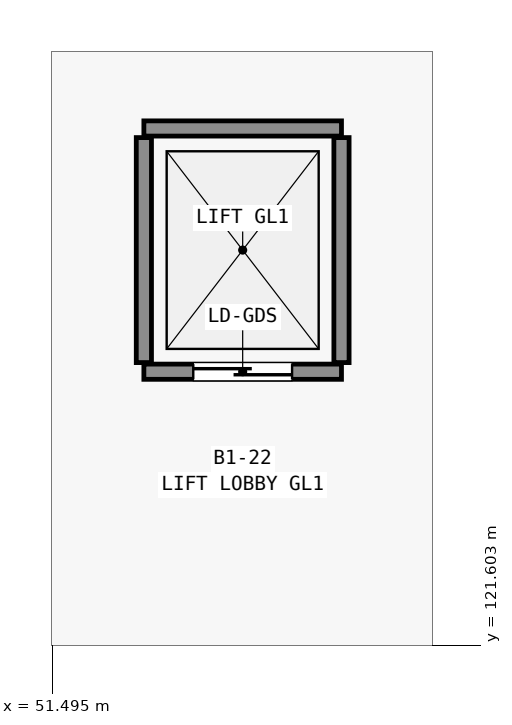
"""IFC4 building model, lengths in metres.
Left out: names, types, materials, properties, quantities, classifications, styles, units other than length and angle.
Written with IfcOpenShell. Run it as: python <this file> out.ifc"""

import sys

from ifc_helpers import new_model, si_unit, direction, frame, frame_2d, origin, place, context, subcontext, project, spatial, rectangle, extrude, element, fill, save


model = new_model("IFC4")
c1 = context("Model", 3, precision=1e-05, world=origin(), true_north=direction((0.0, 1.0)))
c2 = subcontext(c1, "Body", "Model", "MODEL_VIEW")
j1 = project(units=[si_unit("LENGTHUNIT", "METRE"), si_unit("PLANEANGLEUNIT", "RADIAN")], contexts=[c1])
p1 = place(None, origin())
s1 = spatial("IfcSite", under=j1, at=p1, CompositionType="ELEMENT")
p2 = place(p1, origin())
s2 = spatial("IfcBuilding", under=s1, at=p2, CompositionType="ELEMENT")
p3 = place(p2, frame((0.0, 0.0, -5.4)))
s3 = spatial("IfcBuildingStorey", under=s2, at=p3, CompositionType="ELEMENT", Elevation=-5.4)
p4 = place(p3, frame((52.7, 125.2, 0.0), z_axis=(0.0, 0.0, 1.0), x_axis=(1.0, 0.0, 0.0)))
e1 = element("IfcWall", 1, at=p4, inside=s3, PredefinedType="STANDARD", context=c2, shape_type="SweptSolid", body=[
    extrude(rectangle(XDim=2.6, YDim=0.2, at=frame_2d((1.3, 0.0))), origin(), (0.0, 0.0, 1.0), 5.0),
])
p5 = place(p4, frame((0.65, 0.0, 0.0)))
e2 = element("IfcOpeningElement", 2, at=p5, cuts=e1, PredefinedType="OPENING", context=c2, shape_type="SweptSolid", body=[
    extrude(rectangle(XDim=1.3, YDim=2.15, at=frame_2d((0.65, 1.075))), frame((0.0, 0.11, 0.0), z_axis=(0.0, -1.0, 0.0), x_axis=(1.0, 0.0, 0.0)), (0.0, 0.0, 1.0), 0.22),
])
p6 = place(p3, frame((52.7, 128.4, 0.0), z_axis=(0.0, 0.0, 1.0), x_axis=(1.0, 0.0, 0.0)))
e3 = element("IfcWall", 3, at=p6, inside=s3, PredefinedType="STANDARD", context=c2, shape_type="SweptSolid", body=[
    extrude(rectangle(XDim=2.6, YDim=0.2, at=frame_2d((1.3, 0.0))), origin(), (0.0, 0.0, 1.0), 5.0),
])
for number, where, z_axis, x_axis in (
    (4, (52.7, 125.32, 0.0), (0.0, 0.0, 1.0), (0.0, 1.0, 0.0)),
    (5, (55.3, 125.32, 0.0), (0.0, 0.0, 1.0), (0.0, 1.0, 0.0)),
):
    element("IfcWall", number, at=place(p3, frame(where, z_axis=z_axis, x_axis=x_axis)), inside=s3, PredefinedType="STANDARD", context=c2, shape_type="SweptSolid", body=[
        extrude(rectangle(XDim=2.96, YDim=0.2, at=frame_2d((1.48, 0.0))), origin(), (0.0, 0.0, 1.0), 5.0),
    ])
p7 = place(p5, origin())
e6 = element("IfcDoor", 6, at=p7, inside=s3, OperationType="SLIDING_TO_LEFT", PredefinedType="DOOR", context=c2, shape_type="SweptSolid", body=[
    extrude(rectangle(XDim=1.3, YDim=2.15, at=frame_2d((0.65, 1.075))), frame((0.0, 0.025, 0.0), z_axis=(0.0, -1.0, 0.0), x_axis=(1.0, 0.0, 0.0)), (0.0, 0.0, 1.0), 0.05),
])
fill(e2, e6)
save(model, sys.argv[1])
